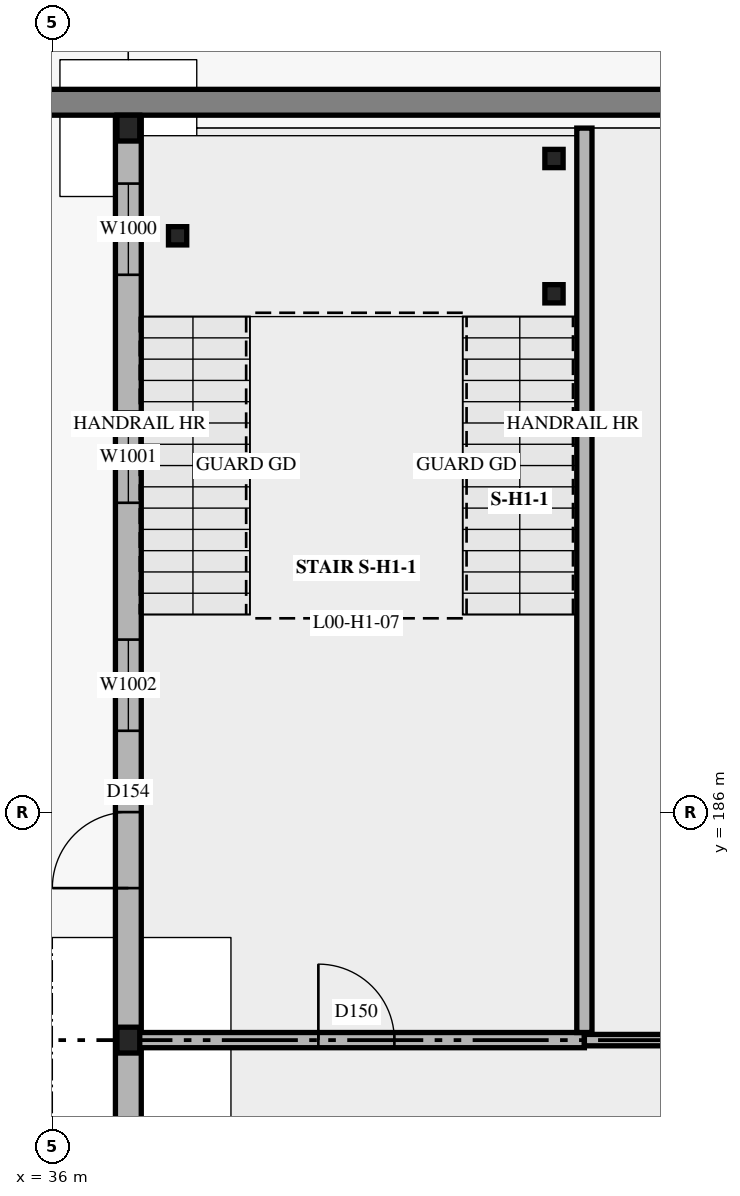
"""IFC4 building model, lengths in metres.
Left out: names, types, materials, properties, quantities, classifications, styles, units other than length and angle.
Written with IfcOpenShell. Run it as: python <this file> out.ifc"""

import sys

from ifc_helpers import new_model, si_unit, direction, frame, frame_2d, origin, origin_2d, place, context, subcontext, project, spatial, rectangle, i_section, extrude, element, fill, save


model = new_model("IFC4")
c1 = context("Model", 3, precision=1e-05, world=origin(), true_north=direction((0.0, 1.0)))
c2 = subcontext(c1, "Body", "Model", "MODEL_VIEW")
j1 = project(units=[si_unit("LENGTHUNIT", "METRE"), si_unit("PLANEANGLEUNIT", "RADIAN")], contexts=[c1])
p1 = place(None, origin())
s1 = spatial("IfcSite", under=j1, at=p1, CompositionType="ELEMENT")
p2 = place(p1, origin())
s2 = spatial("IfcBuilding", under=s1, at=p2, CompositionType="ELEMENT")
p3 = place(p2, origin())
s3 = spatial("IfcBuildingStorey", under=s2, at=p3, CompositionType="ELEMENT", Elevation=0.0)
for number, where, z_axis, x_axis in (
    (1, (37.0, 183.0, 0.0), (0.0, 0.0, 1.0), (1.0, 0.0, 0.0)),
    (2, (37.0, 195.0, 0.0), (0.0, 0.0, 1.0), (1.0, 0.0, 0.0)),
):
    element("IfcColumn", number, at=place(p3, frame(where, z_axis=z_axis, x_axis=x_axis)), inside=s3, PredefinedType="COLUMN", context=c2, shape_type="SweptSolid", body=[
        extrude(i_section(OverallWidth=0.3, OverallDepth=0.34, WebThickness=0.012, FlangeThickness=0.021, at=origin_2d()), origin(), (0.0, 0.0, 1.0), 4.65),
    ])
p4 = place(p3, frame((37.0, 195.17, 0.0), z_axis=(0.0, 0.0, 1.0), x_axis=(0.0, -1.0, 0.0)))
e3 = element("IfcWall", 3, at=p4, inside=s3, PredefinedType="SOLIDWALL", context=c2, shape_type="SweptSolid", body=[
    extrude(rectangle(XDim=24.17, YDim=0.34, at=frame_2d((12.085, 0.0))), origin(), (0.0, 0.0, 1.0), 4.65),
])
p5 = place(p4, frame((10.17, 0.0, 0.0), z_axis=(0.0, 0.0, 1.0), x_axis=(-1.0, 0.0, 0.0)))
e4 = element("IfcOpeningElement", 4, at=p5, cuts=e3, PredefinedType="OPENING", context=c2, shape_type="SweptSolid", body=[
    extrude(rectangle(XDim=1.0, YDim=2.1, at=frame_2d((0.5, 1.05))), frame((0.0, 0.18, 0.0), z_axis=(0.0, -1.0, 0.0), x_axis=(1.0, 0.0, 0.0)), (0.0, 0.0, 1.0), 0.36),
])
p6 = place(p4, frame((0.9, 0.0, 0.9)))
e5 = element("IfcOpeningElement", 5, at=p6, cuts=e3, PredefinedType="OPENING", context=c2, shape_type="SweptSolid", body=[
    extrude(rectangle(XDim=1.2, YDim=3.3, at=frame_2d((0.6, 1.65))), frame((0.0, 0.18, 0.0), z_axis=(0.0, -1.0, 0.0), x_axis=(1.0, 0.0, 0.0)), (0.0, 0.0, 1.0), 0.36),
])
p7 = place(p4, frame((3.9, 0.0, 0.9)))
e6 = element("IfcOpeningElement", 6, at=p7, cuts=e3, PredefinedType="OPENING", context=c2, shape_type="SweptSolid", body=[
    extrude(rectangle(XDim=1.2, YDim=3.3, at=frame_2d((0.6, 1.65))), frame((0.0, 0.18, 0.0), z_axis=(0.0, -1.0, 0.0), x_axis=(1.0, 0.0, 0.0)), (0.0, 0.0, 1.0), 0.36),
])
p8 = place(p4, frame((6.9, 0.0, 0.9)))
e7 = element("IfcOpeningElement", 7, at=p8, cuts=e3, PredefinedType="OPENING", context=c2, shape_type="SweptSolid", body=[
    extrude(rectangle(XDim=1.2, YDim=3.3, at=frame_2d((0.6, 1.65))), frame((0.0, 0.18, 0.0), z_axis=(0.0, -1.0, 0.0), x_axis=(1.0, 0.0, 0.0)), (0.0, 0.0, 1.0), 0.36),
])
p9 = place(p3, frame((30.0, 195.34, 0.0), z_axis=(0.0, 0.0, 1.0), x_axis=(1.0, 0.0, 0.0)))
e8 = element("IfcWall", 8, at=p9, inside=s3, PredefinedType="SOLIDWALL", context=c2, shape_type="SweptSolid", body=[
    extrude(rectangle(XDim=80.0, YDim=0.34, at=frame_2d((40.0, 0.0))), origin(), (0.0, 0.0, 1.0), 5.4),
])
p10 = place(p9, frame((42.5, 0.0, 0.0)))
e9 = element("IfcOpeningElement", 9, at=p10, cuts=e8, PredefinedType="OPENING", context=c2, shape_type="SweptSolid", body=[
    extrude(rectangle(XDim=1.8, YDim=2.1, at=frame_2d((0.9, 1.05))), frame((0.0, 0.18, 0.0), z_axis=(0.0, -1.0, 0.0), x_axis=(1.0, 0.0, 0.0)), (0.0, 0.0, 1.0), 0.36),
])
p11 = place(p9, frame((34.5, 0.0, 0.0)))
e10 = element("IfcOpeningElement", 10, at=p11, cuts=e8, PredefinedType="OPENING", context=c2, shape_type="SweptSolid", body=[
    extrude(rectangle(XDim=1.0, YDim=2.1, at=frame_2d((0.5, 1.05))), frame((0.0, 0.18, 0.0), z_axis=(0.0, -1.0, 0.0), x_axis=(1.0, 0.0, 0.0)), (0.0, 0.0, 1.0), 0.36),
])
p12 = place(p9, frame((68.5, 0.0, 0.0)))
e11 = element("IfcOpeningElement", 11, at=p12, cuts=e8, PredefinedType="OPENING", context=c2, shape_type="SweptSolid", body=[
    extrude(rectangle(XDim=1.0, YDim=2.1, at=frame_2d((0.5, 1.05))), frame((0.0, 0.18, 0.0), z_axis=(0.0, -1.0, 0.0), x_axis=(1.0, 0.0, 0.0)), (0.0, 0.0, 1.0), 0.36),
])
p13 = place(p9, frame((0.9, 0.0, 0.9)))
e12 = element("IfcOpeningElement", 12, at=p13, cuts=e8, PredefinedType="OPENING", context=c2, shape_type="SweptSolid", body=[
    extrude(rectangle(XDim=1.2, YDim=3.3, at=frame_2d((0.6, 1.65))), frame((0.0, 0.18, 0.0), z_axis=(0.0, -1.0, 0.0), x_axis=(1.0, 0.0, 0.0)), (0.0, 0.0, 1.0), 0.36),
])
p14 = place(p9, frame((3.9, 0.0, 0.9)))
e13 = element("IfcOpeningElement", 13, at=p14, cuts=e8, PredefinedType="OPENING", context=c2, shape_type="SweptSolid", body=[
    extrude(rectangle(XDim=1.2, YDim=3.3, at=frame_2d((0.6, 1.65))), frame((0.0, 0.18, 0.0), z_axis=(0.0, -1.0, 0.0), x_axis=(1.0, 0.0, 0.0)), (0.0, 0.0, 1.0), 0.36),
])
p15 = place(p9, frame((18.9, 0.0, 0.9)))
e14 = element("IfcOpeningElement", 14, at=p15, cuts=e8, PredefinedType="OPENING", context=c2, shape_type="SweptSolid", body=[
    extrude(rectangle(XDim=1.2, YDim=3.3, at=frame_2d((0.6, 1.65))), frame((0.0, 0.18, 0.0), z_axis=(0.0, -1.0, 0.0), x_axis=(1.0, 0.0, 0.0)), (0.0, 0.0, 1.0), 0.36),
])
p16 = place(p9, frame((21.9, 0.0, 0.9)))
e15 = element("IfcOpeningElement", 15, at=p16, cuts=e8, PredefinedType="OPENING", context=c2, shape_type="SweptSolid", body=[
    extrude(rectangle(XDim=1.2, YDim=3.3, at=frame_2d((0.6, 1.65))), frame((0.0, 0.18, 0.0), z_axis=(0.0, -1.0, 0.0), x_axis=(1.0, 0.0, 0.0)), (0.0, 0.0, 1.0), 0.36),
])
p17 = place(p9, frame((24.9, 0.0, 0.9)))
e16 = element("IfcOpeningElement", 16, at=p17, cuts=e8, PredefinedType="OPENING", context=c2, shape_type="SweptSolid", body=[
    extrude(rectangle(XDim=1.2, YDim=3.3, at=frame_2d((0.6, 1.65))), frame((0.0, 0.18, 0.0), z_axis=(0.0, -1.0, 0.0), x_axis=(1.0, 0.0, 0.0)), (0.0, 0.0, 1.0), 0.36),
])
p18 = place(p9, frame((30.9, 0.0, 0.9)))
e17 = element("IfcOpeningElement", 17, at=p18, cuts=e8, PredefinedType="OPENING", context=c2, shape_type="SweptSolid", body=[
    extrude(rectangle(XDim=1.2, YDim=3.3, at=frame_2d((0.6, 1.65))), frame((0.0, 0.18, 0.0), z_axis=(0.0, -1.0, 0.0), x_axis=(1.0, 0.0, 0.0)), (0.0, 0.0, 1.0), 0.36),
])
p19 = place(p9, frame((36.9, 0.0, 0.9)))
e18 = element("IfcOpeningElement", 18, at=p19, cuts=e8, PredefinedType="OPENING", context=c2, shape_type="SweptSolid", body=[
    extrude(rectangle(XDim=1.2, YDim=3.3, at=frame_2d((0.6, 1.65))), frame((0.0, 0.18, 0.0), z_axis=(0.0, -1.0, 0.0), x_axis=(1.0, 0.0, 0.0)), (0.0, 0.0, 1.0), 0.36),
])
p20 = place(p9, frame((45.9, 0.0, 0.9)))
e19 = element("IfcOpeningElement", 19, at=p20, cuts=e8, PredefinedType="OPENING", context=c2, shape_type="SweptSolid", body=[
    extrude(rectangle(XDim=1.2, YDim=3.3, at=frame_2d((0.6, 1.65))), frame((0.0, 0.18, 0.0), z_axis=(0.0, -1.0, 0.0), x_axis=(1.0, 0.0, 0.0)), (0.0, 0.0, 1.0), 0.36),
])
p21 = place(p9, frame((48.9, 0.0, 0.9)))
e20 = element("IfcOpeningElement", 20, at=p21, cuts=e8, PredefinedType="OPENING", context=c2, shape_type="SweptSolid", body=[
    extrude(rectangle(XDim=1.2, YDim=3.3, at=frame_2d((0.6, 1.65))), frame((0.0, 0.18, 0.0), z_axis=(0.0, -1.0, 0.0), x_axis=(1.0, 0.0, 0.0)), (0.0, 0.0, 1.0), 0.36),
])
p22 = place(p9, frame((51.9, 0.0, 0.9)))
e21 = element("IfcOpeningElement", 21, at=p22, cuts=e8, PredefinedType="OPENING", context=c2, shape_type="SweptSolid", body=[
    extrude(rectangle(XDim=1.2, YDim=3.3, at=frame_2d((0.6, 1.65))), frame((0.0, 0.18, 0.0), z_axis=(0.0, -1.0, 0.0), x_axis=(1.0, 0.0, 0.0)), (0.0, 0.0, 1.0), 0.36),
])
p23 = place(p9, frame((54.9, 0.0, 0.9)))
e22 = element("IfcOpeningElement", 22, at=p23, cuts=e8, PredefinedType="OPENING", context=c2, shape_type="SweptSolid", body=[
    extrude(rectangle(XDim=1.2, YDim=3.3, at=frame_2d((0.6, 1.65))), frame((0.0, 0.18, 0.0), z_axis=(0.0, -1.0, 0.0), x_axis=(1.0, 0.0, 0.0)), (0.0, 0.0, 1.0), 0.36),
])
p24 = place(p9, frame((57.9, 0.0, 0.9)))
e23 = element("IfcOpeningElement", 23, at=p24, cuts=e8, PredefinedType="OPENING", context=c2, shape_type="SweptSolid", body=[
    extrude(rectangle(XDim=1.2, YDim=3.3, at=frame_2d((0.6, 1.65))), frame((0.0, 0.18, 0.0), z_axis=(0.0, -1.0, 0.0), x_axis=(1.0, 0.0, 0.0)), (0.0, 0.0, 1.0), 0.36),
])
p25 = place(p9, frame((75.9, 0.0, 0.9)))
e24 = element("IfcOpeningElement", 24, at=p25, cuts=e8, PredefinedType="OPENING", context=c2, shape_type="SweptSolid", body=[
    extrude(rectangle(XDim=1.2, YDim=3.3, at=frame_2d((0.6, 1.65))), frame((0.0, 0.18, 0.0), z_axis=(0.0, -1.0, 0.0), x_axis=(1.0, 0.0, 0.0)), (0.0, 0.0, 1.0), 0.36),
])
p26 = place(p3, frame((37.0, 183.0, 0.0), z_axis=(0.0, 0.0, 1.0), x_axis=(1.0, 0.0, 0.0)))
e25 = element("IfcWall", 25, at=p26, inside=s3, PredefinedType="PARTITIONING", context=c2, shape_type="SweptSolid", body=[
    extrude(rectangle(XDim=6.0, YDim=0.2, at=frame_2d((3.0, 0.0))), origin(), (0.0, 0.0, 1.0), 4.65),
])
p27 = place(p26, frame((2.5, 0.0, 0.0)))
e26 = element("IfcOpeningElement", 26, at=p27, cuts=e25, PredefinedType="OPENING", context=c2, shape_type="SweptSolid", body=[
    extrude(rectangle(XDim=1.0, YDim=2.1, at=frame_2d((0.5, 1.05))), frame((0.0, 0.11, 0.0), z_axis=(0.0, -1.0, 0.0), x_axis=(1.0, 0.0, 0.0)), (0.0, 0.0, 1.0), 0.22),
])
p28 = place(p3, frame((43.0, 183.0, 0.0), z_axis=(0.0, 0.0, 1.0), x_axis=(1.0, 0.0, 0.0)))
e27 = element("IfcWall", 27, at=p28, inside=s3, PredefinedType="PARTITIONING", context=c2, shape_type="SweptSolid", body=[
    extrude(rectangle(XDim=10.0, YDim=0.15, at=frame_2d((5.0, 0.0))), origin(), (0.0, 0.0, 1.0), 4.65),
])
p29 = place(p28, frame((7.55, 0.0, 0.0)))
e28 = element("IfcOpeningElement", 28, at=p29, cuts=e27, PredefinedType="OPENING", context=c2, shape_type="SweptSolid", body=[
    extrude(rectangle(XDim=0.9, YDim=2.1, at=frame_2d((0.45, 1.05))), frame((0.0, 0.085, 0.0), z_axis=(0.0, -1.0, 0.0), x_axis=(1.0, 0.0, 0.0)), (0.0, 0.0, 1.0), 0.17),
])
p30 = place(p3, frame((43.0, 183.1, 0.0), z_axis=(0.0, 0.0, 1.0), x_axis=(0.0, 1.0, 0.0)))
e29 = element("IfcWall", 29, at=p30, inside=s3, PredefinedType="PARTITIONING", context=c2, shape_type="SweptSolid", body=[
    extrude(rectangle(XDim=11.9, YDim=0.2, at=frame_2d((5.95, 0.0))), origin(), (0.0, 0.0, 1.0), 5.15),
])
for number, where, z_axis, x_axis in (
    (30, (37.648, 193.583, 0.0), (0.0, 0.0, 1.0), (1.0, 0.0, 0.0)),
    (31, (42.6, 192.82, 0.0), (0.0, 0.0, 1.0), (1.0, 0.0, 0.0)),
    (32, (42.6, 194.6, 0.0), (0.0, 0.0, 1.0), (1.0, 0.0, 0.0)),
):
    element("IfcColumn", number, at=place(p3, frame(where, z_axis=z_axis, x_axis=x_axis)), inside=s3, PredefinedType="COLUMN", context=c2, shape_type="SweptSolid", body=[
        extrude(i_section(OverallWidth=0.24, OverallDepth=0.24, WebThickness=0.01, FlangeThickness=0.017, at=origin_2d()), origin(), (0.0, 0.0, 1.0), 2.5),
    ])
p31 = place(p5, origin())
e33 = element("IfcDoor", 33, at=p31, inside=s3, OperationType="SINGLE_SWING_LEFT", PredefinedType="DOOR", context=c2, shape_type="SweptSolid", body=[
    extrude(rectangle(XDim=1.0, YDim=2.1, at=frame_2d((0.5, 1.05))), frame((0.0, 0.025, 0.0), z_axis=(0.0, -1.0, 0.0), x_axis=(1.0, 0.0, 0.0)), (0.0, 0.0, 1.0), 0.05),
])
fill(e4, e33)
p32 = place(p6, origin())
e34 = element("IfcWindow", 34, at=p32, inside=s3, PartitioningType="SINGLE_PANEL", PredefinedType="WINDOW", context=c2, shape_type="SweptSolid", body=[
    extrude(rectangle(XDim=1.2, YDim=3.3, at=frame_2d((0.6, 1.65))), frame((0.0, 0.03, 0.0), z_axis=(0.0, -1.0, 0.0), x_axis=(1.0, 0.0, 0.0)), (0.0, 0.0, 1.0), 0.06),
])
fill(e5, e34)
p33 = place(p7, origin())
e35 = element("IfcWindow", 35, at=p33, inside=s3, PartitioningType="SINGLE_PANEL", PredefinedType="WINDOW", context=c2, shape_type="SweptSolid", body=[
    extrude(rectangle(XDim=1.2, YDim=3.3, at=frame_2d((0.6, 1.65))), frame((0.0, 0.03, 0.0), z_axis=(0.0, -1.0, 0.0), x_axis=(1.0, 0.0, 0.0)), (0.0, 0.0, 1.0), 0.06),
])
fill(e6, e35)
p34 = place(p8, origin())
e36 = element("IfcWindow", 36, at=p34, inside=s3, PartitioningType="SINGLE_PANEL", PredefinedType="WINDOW", context=c2, shape_type="SweptSolid", body=[
    extrude(rectangle(XDim=1.2, YDim=3.3, at=frame_2d((0.6, 1.65))), frame((0.0, 0.03, 0.0), z_axis=(0.0, -1.0, 0.0), x_axis=(1.0, 0.0, 0.0)), (0.0, 0.0, 1.0), 0.06),
])
fill(e7, e36)
p35 = place(p27, origin())
e37 = element("IfcDoor", 37, at=p35, inside=s3, OperationType="SINGLE_SWING_LEFT", PredefinedType="DOOR", context=c2, shape_type="SweptSolid", body=[
    extrude(rectangle(XDim=1.0, YDim=2.1, at=frame_2d((0.5, 1.05))), frame((0.0, 0.025, 0.0), z_axis=(0.0, -1.0, 0.0), x_axis=(1.0, 0.0, 0.0)), (0.0, 0.0, 1.0), 0.05),
])
fill(e26, e37)
save(model, sys.argv[1])
